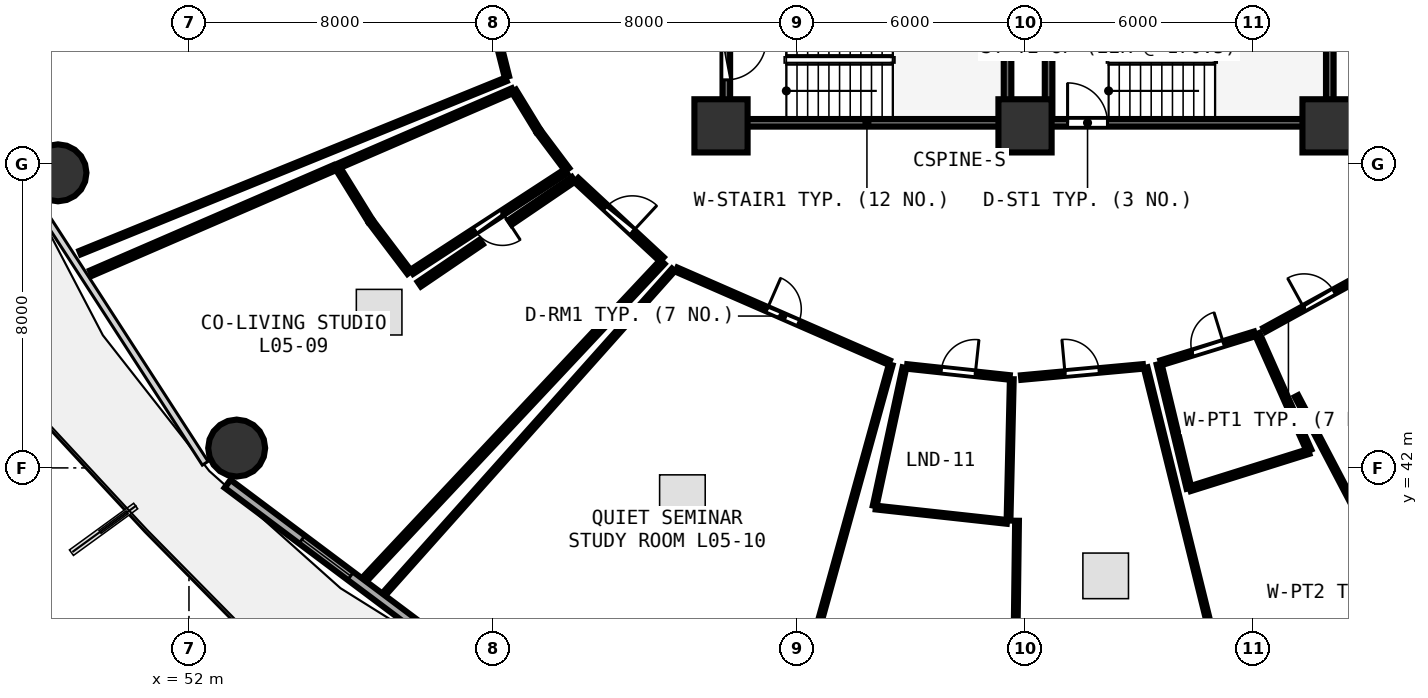
"""IFC4 building model, lengths in metres.
Left out: names, types, materials, properties, quantities, classifications, styles, units other than length and angle.
Written with IfcOpenShell. Run it as: python <this file> out.ifc"""

import sys

from ifc_helpers import new_model, si_unit, direction, frame, frame_2d, origin, origin_2d, place, context, subcontext, project, spatial, rectangle, circle, extrude, element, fill, save


model = new_model("IFC4")
c1 = context("Model", 3, precision=1e-05, world=origin(), true_north=direction((0.0, 1.0)))
c2 = subcontext(c1, "Body", "Model", "MODEL_VIEW")
j1 = project(units=[si_unit("LENGTHUNIT", "METRE"), si_unit("PLANEANGLEUNIT", "RADIAN")], contexts=[c1])
p1 = place(None, origin())
s1 = spatial("IfcSite", under=j1, at=p1, CompositionType="ELEMENT")
p2 = place(p1, origin())
s2 = spatial("IfcBuilding", under=s1, at=p2, CompositionType="ELEMENT")
p3 = place(p2, frame((0.0, 0.0, 22.5)))
s3 = spatial("IfcBuildingStorey", under=s2, at=p3, CompositionType="ELEMENT", Elevation=22.5)
for number, where, z_axis, x_axis in (
    (1, (66.0, 51.0, 0.0), (0.0, 0.0, 1.0), (1.0, 0.0, 0.0)),
    (2, (74.0, 51.0, 0.0), (0.0, 0.0, 1.0), (1.0, 0.0, 0.0)),
    (3, (82.0, 51.0, 0.0), (0.0, 0.0, 1.0), (1.0, 0.0, 0.0)),
):
    element("IfcColumn", number, at=place(p3, frame(where, z_axis=z_axis, x_axis=x_axis)), inside=s3, PredefinedType="PILASTER", context=c2, shape_type="SweptSolid", body=[
        extrude(rectangle(XDim=1.4, YDim=1.4, at=origin_2d()), origin(), (0.0, 0.0, 1.0), 3.75),
    ])
for number, where, z_axis, x_axis in (
    (4, (48.553, 49.764, 0.0), (0.0, 0.0, 1.0), (1.0, 0.0, 0.0)),
    (5, (53.256, 42.522, 0.0), (0.0, 0.0, 1.0), (1.0, 0.0, 0.0)),
):
    element("IfcColumn", number, at=place(p3, frame(where, z_axis=z_axis, x_axis=x_axis)), inside=s3, PredefinedType="COLUMN", context=c2, shape_type="SweptSolid", body=[
        extrude(circle(Radius=0.75, at=origin_2d()), origin(), (0.0, 0.0, 1.0), 3.75),
    ])
p4 = place(p3, frame((53.016, 41.582, 0.0), z_axis=(0.0, 0.0, 1.0), x_axis=(0.80030733173, -0.599590005569, 0.0)))
e6 = element("IfcWall", 6, at=p4, inside=s3, PredefinedType="SOLIDWALL", context=c2, shape_type="SweptSolid", body=[
    extrude(rectangle(XDim=8.291, YDim=0.26, at=frame_2d((4.145, 0.0))), origin(), (0.0, 0.0, 1.0), 3.475),
])
p5 = place(p4, frame((2.445, 0.0, 0.85)))
e7 = element("IfcOpeningElement", 7, at=p5, cuts=e6, PredefinedType="OPENING", context=c2, shape_type="SweptSolid", body=[
    extrude(rectangle(XDim=1.6, YDim=1.45, at=frame_2d((0.8, 0.725))), frame((0.0, 0.14, 0.0), z_axis=(0.0, -1.0, 0.0), x_axis=(1.0, 0.0, 0.0)), (0.0, 0.0, 1.0), 0.28),
])
p6 = place(p3, frame((74.0, 51.08, 0.0), z_axis=(0.0, 0.0, 1.0), x_axis=(1.0, 0.0, 0.0)))
e8 = element("IfcWall", 8, at=p6, inside=s3, PredefinedType="SHEAR", context=c2, shape_type="SweptSolid", body=[
    extrude(rectangle(XDim=7.9, YDim=0.2, at=frame_2d((3.95, 0.0))), origin(), (0.0, 0.0, 1.0), 3.49),
])
p7 = place(p6, frame((1.12, 0.0, 0.0)))
e9 = element("IfcOpeningElement", 9, at=p7, cuts=e8, PredefinedType="OPENING", context=c2, shape_type="SweptSolid", body=[
    extrude(rectangle(XDim=1.05, YDim=2.1, at=frame_2d((0.525, 1.05))), frame((0.0, 0.11, 0.0), z_axis=(0.0, -1.0, 0.0), x_axis=(1.0, 0.0, 0.0)), (0.0, 0.0, 1.0), 0.22),
])
for number, where, z_axis, x_axis in (
    (10, (82.02, 51.2, 0.0), (0.0, 0.0, 1.0), (0.0, 1.0, 0.0)),
    (11, (74.62, 54.27, 0.0), (0.0, 0.0, 1.0), (0.0, -1.0, 0.0)),
):
    element("IfcWall", number, at=place(p3, frame(where, z_axis=z_axis, x_axis=x_axis)), inside=s3, PredefinedType="SHEAR", context=c2, shape_type="SweptSolid", body=[
        extrude(rectangle(XDim=3.07, YDim=0.2, at=frame_2d((1.535, 0.0))), origin(), (0.0, 0.0, 1.0), 3.49),
    ])
p8 = place(p3, frame((66.26, 51.08, 0.0), z_axis=(0.0, 0.0, 1.0), x_axis=(1.0, 0.0, 0.0)))
e12 = element("IfcWall", 12, at=p8, inside=s3, PredefinedType="SHEAR", context=c2, shape_type="SweptSolid", body=[
    extrude(rectangle(XDim=7.16, YDim=0.2, at=frame_2d((3.58, 0.0))), origin(), (0.0, 0.0, 1.0), 3.49),
])
p9 = place(p3, frame((73.54, 51.2, 0.0), z_axis=(0.0, 0.0, 1.0), x_axis=(0.0, 1.0, 0.0)))
e13 = element("IfcWall", 13, at=p9, inside=s3, PredefinedType="SHEAR", context=c2, shape_type="SweptSolid", body=[
    extrude(rectangle(XDim=3.07, YDim=0.2, at=frame_2d((1.535, 0.0))), origin(), (0.0, 0.0, 1.0), 3.49),
])
p10 = place(p3, frame((66.14, 54.27, 0.0), z_axis=(0.0, 0.0, 1.0), x_axis=(0.0, -1.0, 0.0)))
e14 = element("IfcWall", 14, at=p10, inside=s3, PredefinedType="SHEAR", context=c2, shape_type="SweptSolid", body=[
    extrude(rectangle(XDim=3.07, YDim=0.2, at=frame_2d((1.535, 0.0))), origin(), (0.0, 0.0, 1.0), 3.49),
])
p11 = place(p10, frame((1.01, 0.0, 0.0)))
e15 = element("IfcOpeningElement", 15, at=p11, cuts=e14, PredefinedType="OPENING", context=c2, shape_type="SweptSolid", body=[
    extrude(rectangle(XDim=1.05, YDim=2.1, at=frame_2d((0.525, 1.05))), frame((0.0, 0.11, 0.0), z_axis=(0.0, -1.0, 0.0), x_axis=(1.0, 0.0, 0.0)), (0.0, 0.0, 1.0), 0.22),
])
p12 = place(p3, frame((58.986, 57.775, 0.0), z_axis=(0.0, 0.0, 1.0), x_axis=(0.244192294026, -0.969726829338, 0.0)))
e16 = element("IfcWall", 16, at=p12, inside=s3, PredefinedType="PARTITIONING", context=c2, shape_type="SweptSolid", body=[
    extrude(rectangle(XDim=5.651, YDim=0.12, at=frame_2d((2.825, 0.0))), origin(), (0.0, 0.0, 1.0), 3.48),
])
p13 = place(p12, frame((2.375, 0.0, 0.0)))
e17 = element("IfcOpeningElement", 17, at=p13, cuts=e16, PredefinedType="OPENING", context=c2, shape_type="SweptSolid", body=[
    extrude(rectangle(XDim=0.9, YDim=2.08, at=frame_2d((0.45, 1.04))), frame((0.0, 0.07, 0.0), z_axis=(0.0, -1.0, 0.0), x_axis=(1.0, 0.0, 0.0)), (0.0, 0.0, 1.0), 0.14),
])
p14 = place(p3, frame((61.917, 49.8, 0.0), z_axis=(0.0, 0.0, 1.0), x_axis=(-0.837796261941, -0.545982988267, 0.0)))
e18 = element("IfcWall", 18, at=p14, inside=s3, PredefinedType="PLUMBINGWALL", context=c2, shape_type="SweptSolid", body=[
    extrude(rectangle(XDim=4.838, YDim=0.13, at=frame_2d((2.419, 0.0))), origin(), (0.0, 0.0, 1.0), 3.235),
])
p15 = place(p14, frame((1.989, 0.0, 0.0)))
e19 = element("IfcOpeningElement", 19, at=p15, cuts=e18, PredefinedType="OPENING", context=c2, shape_type="SweptSolid", body=[
    extrude(rectangle(XDim=0.86, YDim=2.05, at=frame_2d((0.43, 1.025))), frame((0.0, 0.075, 0.0), z_axis=(0.0, -1.0, 0.0), x_axis=(1.0, 0.0, 0.0)), (0.0, 0.0, 1.0), 0.15),
])
p16 = place(p3, frame((62.194, 49.575, 0.0), z_axis=(0.0, 0.0, 1.0), x_axis=(0.7329267348, -0.680307578538, 0.0)))
e20 = element("IfcWall", 20, at=p16, inside=s3, PredefinedType="PARTITIONING", context=c2, shape_type="SweptSolid", body=[
    extrude(rectangle(XDim=3.067, YDim=0.15, at=frame_2d((1.533, 0.0))), origin(), (0.0, 0.0, 1.0), 2.875),
])
p17 = place(p16, frame((1.059, 0.0, 0.0)))
e21 = element("IfcOpeningElement", 21, at=p17, cuts=e20, PredefinedType="OPENING", context=c2, shape_type="SweptSolid", body=[
    extrude(rectangle(XDim=0.95, YDim=2.08, at=frame_2d((0.475, 1.04))), frame((0.0, 0.085, 0.0), z_axis=(0.0, -1.0, 0.0), x_axis=(1.0, 0.0, 0.0)), (0.0, 0.0, 1.0), 0.17),
])
p18 = place(p3, frame((64.828, 47.217, 0.0), z_axis=(0.0, 0.0, 1.0), x_axis=(0.916419655578, -0.400218708797, 0.0)))
e22 = element("IfcWall", 22, at=p18, inside=s3, PredefinedType="PARTITIONING", context=c2, shape_type="SweptSolid", body=[
    extrude(rectangle(XDim=6.104, YDim=0.12, at=frame_2d((3.052, 0.0))), origin(), (0.0, 0.0, 1.0), 2.875),
])
p19 = place(p18, frame((2.602, 0.0, 0.0)))
e23 = element("IfcOpeningElement", 23, at=p19, cuts=e22, PredefinedType="OPENING", context=c2, shape_type="SweptSolid", body=[
    extrude(rectangle(XDim=0.9, YDim=2.08, at=frame_2d((0.45, 1.04))), frame((0.0, 0.07, 0.0), z_axis=(0.0, -1.0, 0.0), x_axis=(1.0, 0.0, 0.0)), (0.0, 0.0, 1.0), 0.14),
])
p20 = place(p3, frame((70.895, 44.67, 0.0), z_axis=(0.0, 0.0, 1.0), x_axis=(0.994302004983, -0.106599825921, 0.0)))
e24 = element("IfcWall", 24, at=p20, inside=s3, PredefinedType="PARTITIONING", context=c2, shape_type="SweptSolid", body=[
    extrude(rectangle(XDim=2.714, YDim=0.12, at=frame_2d((1.357, 0.0))), origin(), (0.0, 0.0, 1.0), 3.235),
])
p21 = place(p20, frame((0.907, 0.0, 0.0)))
e25 = element("IfcOpeningElement", 25, at=p21, cuts=e24, PredefinedType="OPENING", context=c2, shape_type="SweptSolid", body=[
    extrude(rectangle(XDim=0.9, YDim=2.08, at=frame_2d((0.45, 1.04))), frame((0.0, 0.07, 0.0), z_axis=(0.0, -1.0, 0.0), x_axis=(1.0, 0.0, 0.0)), (0.0, 0.0, 1.0), 0.14),
])
p22 = place(p3, frame((73.897, 44.376, 0.0), z_axis=(0.0, 0.0, 1.0), x_axis=(0.995829610124, 0.091232601628, 0.0)))
e26 = element("IfcWall", 26, at=p22, inside=s3, PredefinedType="PARTITIONING", context=c2, shape_type="SweptSolid", body=[
    extrude(rectangle(XDim=3.222, YDim=0.12, at=frame_2d((1.611, 0.0))), origin(), (0.0, 0.0, 1.0), 3.235),
])
p23 = place(p22, frame((1.161, 0.0, 0.0)))
e27 = element("IfcOpeningElement", 27, at=p23, cuts=e26, PredefinedType="OPENING", context=c2, shape_type="SweptSolid", body=[
    extrude(rectangle(XDim=0.9, YDim=2.08, at=frame_2d((0.45, 1.04))), frame((0.0, 0.07, 0.0), z_axis=(0.0, -1.0, 0.0), x_axis=(1.0, 0.0, 0.0)), (0.0, 0.0, 1.0), 0.14),
])
p24 = place(p3, frame((77.58, 44.768, 0.0), z_axis=(0.0, 0.0, 1.0), x_axis=(0.955754448098, 0.294165659011, 0.0)))
e28 = element("IfcWall", 28, at=p24, inside=s3, PredefinedType="PLUMBINGWALL", context=c2, shape_type="SweptSolid", body=[
    extrude(rectangle(XDim=2.579, YDim=0.13, at=frame_2d((1.29, 0.0))), origin(), (0.0, 0.0, 1.0), 3.235),
])
p25 = place(p24, frame((0.86, 0.0, 0.0)))
e29 = element("IfcOpeningElement", 29, at=p25, cuts=e28, PredefinedType="OPENING", context=c2, shape_type="SweptSolid", body=[
    extrude(rectangle(XDim=0.86, YDim=2.05, at=frame_2d((0.43, 1.025))), frame((0.0, 0.075, 0.0), z_axis=(0.0, -1.0, 0.0), x_axis=(1.0, 0.0, 0.0)), (0.0, 0.0, 1.0), 0.15),
])
p26 = place(p3, frame((80.299, 45.632, 0.0), z_axis=(0.0, 0.0, 1.0), x_axis=(0.876387079092, 0.481607399861, 0.0)))
e30 = element("IfcWall", 30, at=p26, inside=s3, PredefinedType="PARTITIONING", context=c2, shape_type="SweptSolid", body=[
    extrude(rectangle(XDim=3.281, YDim=0.12, at=frame_2d((1.641, 0.0))), origin(), (0.0, 0.0, 1.0), 2.875),
])
p27 = place(p26, frame((1.191, 0.0, 0.0)))
e31 = element("IfcOpeningElement", 31, at=p27, cuts=e30, PredefinedType="OPENING", context=c2, shape_type="SweptSolid", body=[
    extrude(rectangle(XDim=0.9, YDim=2.08, at=frame_2d((0.45, 1.04))), frame((0.0, 0.07, 0.0), z_axis=(0.0, -1.0, 0.0), x_axis=(1.0, 0.0, 0.0)), (0.0, 0.0, 1.0), 0.14),
])
p28 = place(p3, frame((60.343, 52.222, 0.0), z_axis=(0.0, 0.0, 1.0), x_axis=(-0.926333713065, -0.376703931542, 0.0)))
e32 = element("IfcWall", 32, at=p28, inside=s3, PredefinedType="PARTITIONING", context=c2, shape_type="SweptSolid", body=[
    extrude(rectangle(XDim=12.099, YDim=0.1, at=frame_2d((6.05, 0.0))), origin(), (0.0, 0.0, 1.0), 2.875),
])
p29 = place(p3, frame((60.549, 51.92, 0.0), z_axis=(0.0, 0.0, 1.0), x_axis=(0.52146609248, -0.853272004928, 0.0)))
e33 = element("IfcWall", 33, at=p29, inside=s3, PredefinedType="PLUMBINGWALL", context=c2, shape_type="SweptSolid", body=[
    extrude(rectangle(XDim=1.228, YDim=0.13, at=frame_2d((0.614, 0.0))), origin(), (0.0, 0.0, 1.0), 3.48),
])
p30 = place(p3, frame((61.212, 50.839, 0.0), z_axis=(0.0, 0.0, 1.0), x_axis=(0.600347056143, -0.79973959023, 0.0)))
e34 = element("IfcWall", 34, at=p30, inside=s3, PredefinedType="PLUMBINGWALL", context=c2, shape_type="SweptSolid", body=[
    extrude(rectangle(XDim=1.238, YDim=0.13, at=frame_2d((0.619, 0.0))), origin(), (0.0, 0.0, 1.0), 2.875),
])
p31 = place(p3, frame((57.801, 47.142, 0.0), z_axis=(0.0, 0.0, 1.0), x_axis=(-0.60376191721, 0.797164692725, 0.0)))
e35 = element("IfcWall", 35, at=p31, inside=s3, PredefinedType="PLUMBINGWALL", context=c2, shape_type="SweptSolid", body=[
    extrude(rectangle(XDim=1.669, YDim=0.13, at=frame_2d((0.834, 0.0))), origin(), (0.0, 0.0, 1.0), 3.175),
])
p32 = place(p3, frame((56.771, 48.505, 0.0), z_axis=(0.0, 0.0, 1.0), x_axis=(-0.525540089642, 0.850768837099, 0.0)))
e36 = element("IfcWall", 36, at=p32, inside=s3, PredefinedType="PLUMBINGWALL", context=c2, shape_type="SweptSolid", body=[
    extrude(rectangle(XDim=1.651, YDim=0.13, at=frame_2d((0.826, 0.0))), origin(), (0.0, 0.0, 1.0), 3.175),
])
p33 = place(p3, frame((55.91, 49.935, 0.0), z_axis=(0.0, 0.0, 1.0), x_axis=(0.917797204715, 0.397049481826, 0.0)))
e37 = element("IfcWall", 37, at=p33, inside=s3, PredefinedType="PLUMBINGWALL", context=c2, shape_type="SweptSolid", body=[
    extrude(rectangle(XDim=5.023, YDim=0.13, at=frame_2d((2.511, 0.0))), origin(), (0.0, 0.0, 1.0), 2.875),
])
p34 = place(p3, frame((64.458, 47.419, 0.0), z_axis=(0.0, 0.0, 1.0), x_axis=(-0.684261294523, -0.729236916796, 0.0)))
e38 = element("IfcWall", 38, at=p34, inside=s3, PredefinedType="PARTITIONING", context=c2, shape_type="SweptSolid", body=[
    extrude(rectangle(XDim=11.438, YDim=0.15, at=frame_2d((5.719, 0.0))), origin(), (0.0, 0.0, 1.0), 2.875),
])
p35 = place(p3, frame((49.426, 47.126, 0.0), z_axis=(0.0, 0.0, 1.0), x_axis=(0.917736225937, 0.397190407239, 0.0)))
e39 = element("IfcWall", 39, at=p35, inside=s3, PredefinedType="PARTITIONING", context=c2, shape_type="SweptSolid", body=[
    extrude(rectangle(XDim=6.967, YDim=0.15, at=frame_2d((3.483, 0.0))), origin(), (0.0, 0.0, 1.0), 2.875),
])
p36 = place(p3, frame((58.061, 46.834, 0.0), z_axis=(0.0, 0.0, 1.0), x_axis=(0.826811291248, 0.562479411769, 0.0)))
e40 = element("IfcWall", 40, at=p36, inside=s3, PredefinedType="PARTITIONING", context=c2, shape_type="SweptSolid", body=[
    extrude(rectangle(XDim=1.971, YDim=0.15, at=frame_2d((0.985, 0.0))), origin(), (0.0, 0.0, 1.0), 3.48),
])
p37 = place(p3, frame((60.451, 48.461, 0.0), z_axis=(0.0, 0.0, 1.0), x_axis=(0.826867883695, 0.562396215237, 0.0)))
e41 = element("IfcWall", 41, at=p37, inside=s3, PredefinedType="PARTITIONING", context=c2, shape_type="SweptSolid", body=[
    extrude(rectangle(XDim=2.014, YDim=0.15, at=frame_2d((1.007, 0.0))), origin(), (0.0, 0.0, 1.0), 3.235),
])
p38 = place(p3, frame((70.466, 44.711, 0.0), z_axis=(0.0, 0.0, 1.0), x_axis=(-0.26671307518, -0.963775977875, 0.0)))
e42 = element("IfcWall", 42, at=p38, inside=s3, PredefinedType="PARTITIONING", context=c2, shape_type="SweptSolid", body=[
    extrude(rectangle(XDim=10.865, YDim=0.1, at=frame_2d((5.432, 0.0))), origin(), (0.0, 0.0, 1.0), 2.875),
])
p39 = place(p3, frame((57.156, 38.706, 0.0), z_axis=(0.0, 0.0, 1.0), x_axis=(0.66580890104, 0.746122313897, 0.0)))
e43 = element("IfcWall", 43, at=p39, inside=s3, PredefinedType="PARTITIONING", context=c2, shape_type="SweptSolid", body=[
    extrude(rectangle(XDim=11.399, YDim=0.1, at=frame_2d((5.7, 0.0))), origin(), (0.0, 0.0, 1.0), 2.875),
])
p40 = place(p3, frame((73.652, 44.334, 0.0), z_axis=(0.0, 0.0, 1.0), x_axis=(-0.02316715399, -0.99973160547, 0.0)))
e44 = element("IfcWall", 44, at=p40, inside=s3, PredefinedType="PARTITIONING", context=c2, shape_type="SweptSolid", body=[
    extrude(rectangle(XDim=3.72, YDim=0.1, at=frame_2d((1.86, 0.0))), origin(), (0.0, 0.0, 1.0), 3.175),
])
p41 = place(p3, frame((73.525, 40.579, 0.0), z_axis=(0.0, 0.0, 1.0), x_axis=(-0.994070147468, 0.108740709544, 0.0)))
e45 = element("IfcWall", 45, at=p41, inside=s3, PredefinedType="PARTITIONING", context=c2, shape_type="SweptSolid", body=[
    extrude(rectangle(XDim=3.471, YDim=0.1, at=frame_2d((1.735, 0.0))), origin(), (0.0, 0.0, 1.0), 3.175),
])
p42 = place(p3, frame((70.043, 41.0, 0.0), z_axis=(0.0, 0.0, 1.0), x_axis=(0.210519412271, 0.977589677246, 0.0)))
e46 = element("IfcWall", 46, at=p42, inside=s3, PredefinedType="PARTITIONING", context=c2, shape_type="SweptSolid", body=[
    extrude(rectangle(XDim=3.72, YDim=0.1, at=frame_2d((1.86, 0.0))), origin(), (0.0, 0.0, 1.0), 3.175),
])
p43 = place(p3, frame((77.175, 44.637, 0.0), z_axis=(0.0, 0.0, 1.0), x_axis=(0.239971369295, -0.970779965759, 0.0)))
e47 = element("IfcWall", 47, at=p43, inside=s3, PredefinedType="PARTITIONING", context=c2, shape_type="SweptSolid", body=[
    extrude(rectangle(XDim=10.846, YDim=0.1, at=frame_2d((5.423, 0.0))), origin(), (0.0, 0.0, 1.0), 2.875),
])
p44 = place(p3, frame((73.701, 33.561, 0.0), z_axis=(0.0, 0.0, 1.0), x_axis=(0.012537113793, 0.9999214073, 0.0)))
e48 = element("IfcWall", 48, at=p44, inside=s3, PredefinedType="PARTITIONING", context=c2, shape_type="SweptSolid", body=[
    extrude(rectangle(XDim=7.049, YDim=0.1, at=frame_2d((3.525, 0.0))), origin(), (0.0, 0.0, 1.0), 2.875),
])
p45 = place(p3, frame((80.111, 45.526, 0.0), z_axis=(0.0, 0.0, 1.0), x_axis=(0.405936178007, -0.913901427608, 0.0)))
e49 = element("IfcWall", 49, at=p45, inside=s3, PredefinedType="PLUMBINGWALL", context=c2, shape_type="SweptSolid", body=[
    extrude(rectangle(XDim=3.36, YDim=0.13, at=frame_2d((1.68, 0.0))), origin(), (0.0, 0.0, 1.0), 2.875),
])
p46 = place(p3, frame((81.464, 42.431, 0.0), z_axis=(0.0, 0.0, 1.0), x_axis=(-0.954175708416, -0.299246917226, 0.0)))
e50 = element("IfcWall", 50, at=p46, inside=s3, PredefinedType="PLUMBINGWALL", context=c2, shape_type="SweptSolid", body=[
    extrude(rectangle(XDim=3.275, YDim=0.13, at=frame_2d((1.637, 0.0))), origin(), (0.0, 0.0, 1.0), 2.875),
])
p47 = place(p3, frame((78.315, 41.464, 0.0), z_axis=(0.0, 0.0, 1.0), x_axis=(-0.234406131581, 0.972138758345, 0.0)))
e51 = element("IfcWall", 51, at=p47, inside=s3, PredefinedType="PLUMBINGWALL", context=c2, shape_type="SweptSolid", body=[
    extrude(rectangle(XDim=3.36, YDim=0.13, at=frame_2d((1.68, 0.0))), origin(), (0.0, 0.0, 1.0), 3.235),
])
p48 = place(p3, frame((85.401, 35.769, 0.0), z_axis=(0.0, 0.0, 1.0), x_axis=(-0.464308397246, 0.885673592384, 0.0)))
e52 = element("IfcWall", 52, at=p48, inside=s3, PredefinedType="PARTITIONING", context=c2, shape_type="SweptSolid", body=[
    extrude(rectangle(XDim=9.17, YDim=0.1, at=frame_2d((4.585, 0.0))), origin(), (0.0, 0.0, 1.0), 2.875),
])
p49 = place(p5, origin())
e53 = element("IfcWindow", 53, at=p49, inside=s3, PartitioningType="SINGLE_PANEL", PredefinedType="WINDOW", context=c2, shape_type="SweptSolid", body=[
    extrude(rectangle(XDim=1.6, YDim=1.45, at=frame_2d((0.8, 0.725))), frame((0.0, 0.03, 0.0), z_axis=(0.0, -1.0, 0.0), x_axis=(1.0, 0.0, 0.0)), (0.0, 0.0, 1.0), 0.06),
])
fill(e7, e53)
p50 = place(p7, origin())
e54 = element("IfcDoor", 54, at=p50, inside=s3, OperationType="SINGLE_SWING_LEFT", PredefinedType="DOOR", context=c2, shape_type="SweptSolid", body=[
    extrude(rectangle(XDim=1.05, YDim=2.1, at=frame_2d((0.525, 1.05))), frame((0.0, 0.025, 0.0), z_axis=(0.0, -1.0, 0.0), x_axis=(1.0, 0.0, 0.0)), (0.0, 0.0, 1.0), 0.05),
])
fill(e9, e54)
p51 = place(p11, origin())
e55 = element("IfcDoor", 55, at=p51, inside=s3, OperationType="SINGLE_SWING_LEFT", PredefinedType="DOOR", context=c2, shape_type="SweptSolid", body=[
    extrude(rectangle(XDim=1.05, YDim=2.1, at=frame_2d((0.525, 1.05))), frame((0.0, 0.025, 0.0), z_axis=(0.0, -1.0, 0.0), x_axis=(1.0, 0.0, 0.0)), (0.0, 0.0, 1.0), 0.05),
])
fill(e15, e55)
p52 = place(p15, origin())
e56 = element("IfcDoor", 56, at=p52, inside=s3, OperationType="SINGLE_SWING_LEFT", PredefinedType="DOOR", context=c2, shape_type="SweptSolid", body=[
    extrude(rectangle(XDim=0.86, YDim=2.05, at=frame_2d((0.43, 1.025))), frame((0.0, 0.025, 0.0), z_axis=(0.0, -1.0, 0.0), x_axis=(1.0, 0.0, 0.0)), (0.0, 0.0, 1.0), 0.05),
])
fill(e19, e56)
p53 = place(p17, origin())
e57 = element("IfcDoor", 57, at=p53, inside=s3, OperationType="SINGLE_SWING_RIGHT", PredefinedType="DOOR", context=c2, shape_type="SweptSolid", body=[
    extrude(rectangle(XDim=0.95, YDim=2.08, at=frame_2d((0.475, 1.04))), frame((0.0, 0.025, 0.0), z_axis=(0.0, -1.0, 0.0), x_axis=(1.0, 0.0, 0.0)), (0.0, 0.0, 1.0), 0.05),
])
fill(e21, e57)
p54 = place(p19, origin())
e58 = element("IfcDoor", 58, at=p54, inside=s3, OperationType="SINGLE_SWING_LEFT", PredefinedType="DOOR", context=c2, shape_type="SweptSolid", body=[
    extrude(rectangle(XDim=0.9, YDim=2.08, at=frame_2d((0.45, 1.04))), frame((0.0, 0.025, 0.0), z_axis=(0.0, -1.0, 0.0), x_axis=(1.0, 0.0, 0.0)), (0.0, 0.0, 1.0), 0.05),
])
fill(e23, e58)
p55 = place(p21, origin())
e59 = element("IfcDoor", 59, at=p55, inside=s3, OperationType="SINGLE_SWING_RIGHT", PredefinedType="DOOR", context=c2, shape_type="SweptSolid", body=[
    extrude(rectangle(XDim=0.9, YDim=2.08, at=frame_2d((0.45, 1.04))), frame((0.0, 0.025, 0.0), z_axis=(0.0, -1.0, 0.0), x_axis=(1.0, 0.0, 0.0)), (0.0, 0.0, 1.0), 0.05),
])
fill(e25, e59)
p56 = place(p23, origin())
e60 = element("IfcDoor", 60, at=p56, inside=s3, OperationType="SINGLE_SWING_LEFT", PredefinedType="DOOR", context=c2, shape_type="SweptSolid", body=[
    extrude(rectangle(XDim=0.9, YDim=2.08, at=frame_2d((0.45, 1.04))), frame((0.0, 0.025, 0.0), z_axis=(0.0, -1.0, 0.0), x_axis=(1.0, 0.0, 0.0)), (0.0, 0.0, 1.0), 0.05),
])
fill(e27, e60)
p57 = place(p25, origin())
e61 = element("IfcDoor", 61, at=p57, inside=s3, OperationType="SINGLE_SWING_RIGHT", PredefinedType="DOOR", context=c2, shape_type="SweptSolid", body=[
    extrude(rectangle(XDim=0.86, YDim=2.05, at=frame_2d((0.43, 1.025))), frame((0.0, 0.025, 0.0), z_axis=(0.0, -1.0, 0.0), x_axis=(1.0, 0.0, 0.0)), (0.0, 0.0, 1.0), 0.05),
])
fill(e29, e61)
p58 = place(p27, origin())
e62 = element("IfcDoor", 62, at=p58, inside=s3, OperationType="SINGLE_SWING_LEFT", PredefinedType="DOOR", context=c2, shape_type="SweptSolid", body=[
    extrude(rectangle(XDim=0.9, YDim=2.08, at=frame_2d((0.45, 1.04))), frame((0.0, 0.025, 0.0), z_axis=(0.0, -1.0, 0.0), x_axis=(1.0, 0.0, 0.0)), (0.0, 0.0, 1.0), 0.05),
])
fill(e31, e62)
save(model, sys.argv[1])
